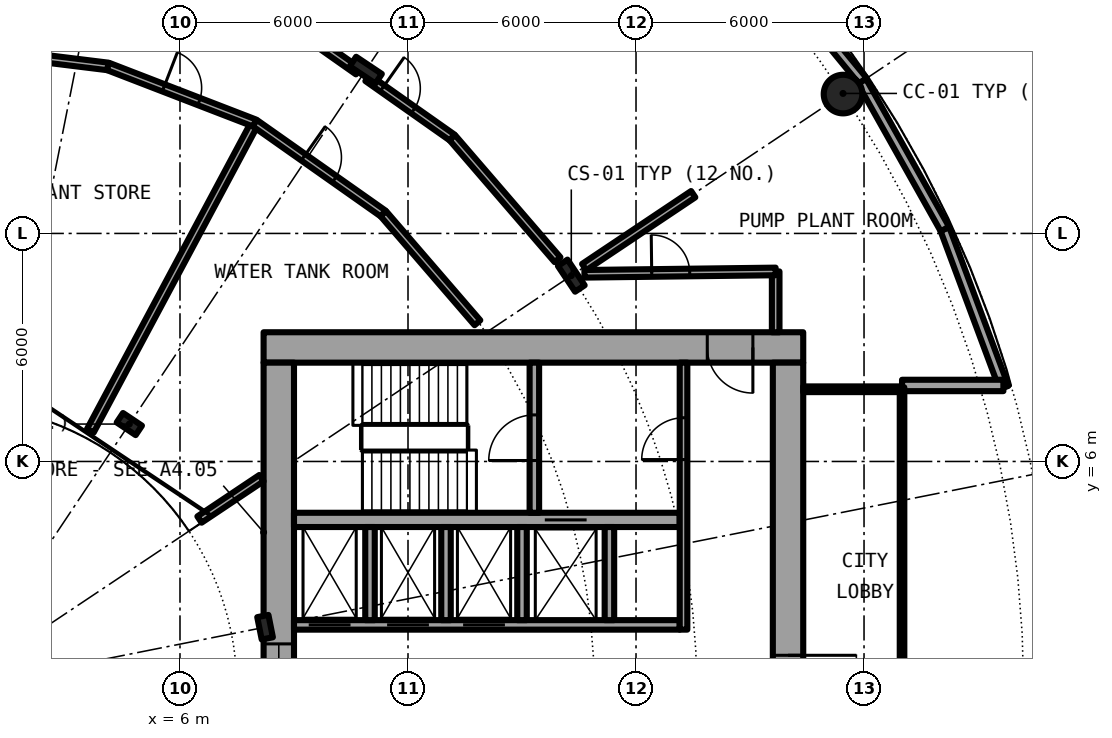
"""IFC4 building model, lengths in metres.
Left out: names, types, materials, properties, quantities, classifications, styles, units other than length and angle.
Written with IfcOpenShell. Run it as: python <this file> out.ifc"""

import sys

from ifc_helpers import new_model, si_unit, direction, frame, frame_2d, origin, origin_2d, place, context, subcontext, project, spatial, rectangle, hollow_circle, i_section, extrude, element, fill, save


model = new_model("IFC4")
c1 = context("Model", 3, precision=1e-05, world=origin(), true_north=direction((0.0, 1.0)))
c2 = subcontext(c1, "Body", "Model", "MODEL_VIEW")
j1 = project(units=[si_unit("LENGTHUNIT", "METRE"), si_unit("PLANEANGLEUNIT", "RADIAN")], contexts=[c1])
p1 = place(None, origin())
s1 = spatial("IfcSite", under=j1, at=p1, CompositionType="ELEMENT")
p2 = place(p1, origin())
s2 = spatial("IfcBuilding", under=s1, at=p2, CompositionType="ELEMENT")
p3 = place(p2, frame((0.0, 0.0, 18.3)))
s3 = spatial("IfcBuildingStorey", under=s2, at=p3, CompositionType="ELEMENT", Elevation=18.3)
p4 = place(p3, frame((23.448, 15.667, 0.0), z_axis=(0.0, 0.0, 1.0), x_axis=(1.0, 0.0, 0.0)))
e1 = element("IfcColumn", 1, at=p4, inside=s3, PredefinedType="COLUMN", context=c2, shape_type="SweptSolid", body=[
    extrude(hollow_circle(Radius=0.508, WallThickness=0.05, at=origin_2d()), origin(), (0.0, 0.0, 1.0), 4.5),
])
for number, where, z_axis, x_axis in (
    (2, (16.297, 10.889, 0.0), (0.0, 0.0, 1.0), (0.831, 0.556, 0.0)),
    (3, (10.889, 16.297, 0.0), (0.0, 0.0, 1.0), (0.556, 0.831, 0.0)),
):
    element("IfcColumn", number, at=place(p3, frame(where, z_axis=z_axis, x_axis=x_axis)), inside=s3, PredefinedType="COLUMN", context=c2, shape_type="SweptSolid", body=[
        extrude(i_section(OverallWidth=0.303, OverallDepth=0.814, WebThickness=0.021, FlangeThickness=0.04, FilletRadius=0.03, at=origin_2d()), origin(), (0.0, 0.0, 1.0), 4.5),
    ])
for number, where, z_axis, x_axis in (
    (4, (8.239, 1.639, 0.0), (0.0, 0.0, 1.0), (0.981, 0.195, 0.0)),
    (5, (4.667, 6.984, 0.0), (0.0, 0.0, 1.0), (0.556, 0.831, 0.0)),
):
    element("IfcColumn", number, at=place(p3, frame(where, z_axis=z_axis, x_axis=x_axis)), inside=s3, PredefinedType="COLUMN", context=c2, shape_type="SweptSolid", body=[
        extrude(i_section(OverallWidth=0.3, OverallDepth=0.6, WebThickness=0.015, FlangeThickness=0.03, FilletRadius=0.027, at=origin_2d()), origin(), (0.0, 0.0, 1.0), 4.5),
    ])
p5 = place(p3, frame((23.967, 16.014, 0.0), z_axis=(0.0, 0.0, 1.0), x_axis=(-0.634403999748, 0.773001659186, 0.0)))
e6 = element("IfcWall", 6, at=p5, inside=s3, PredefinedType="SOLIDWALL", context=c2, shape_type="SweptSolid", body=[
    extrude(rectangle(XDim=5.651, YDim=0.25, at=frame_2d((2.825, 0.0))), origin(), (0.0, 0.0, 1.0), 4.15),
])
p6 = place(p3, frame((27.682, 7.945, 0.0), z_axis=(0.0, 0.0, 1.0), x_axis=(-0.349247811493, 0.937030397675, 0.0)))
e7 = element("IfcWall", 7, at=p6, inside=s3, PredefinedType="SOLIDWALL", context=c2, shape_type="SweptSolid", body=[
    extrude(rectangle(XDim=4.452, YDim=0.25, at=frame_2d((2.226, 0.0))), origin(), (0.0, 0.0, 1.0), 4.15),
])
p7 = place(p3, frame((26.127, 12.117, 0.0), z_axis=(0.0, 0.0, 1.0), x_axis=(-0.489696356642, 0.871893042919, 0.0)))
e8 = element("IfcWall", 8, at=p7, inside=s3, PredefinedType="SOLIDWALL", context=c2, shape_type="SweptSolid", body=[
    extrude(rectangle(XDim=4.454, YDim=0.25, at=frame_2d((2.227, 0.0))), origin(), (0.0, 0.0, 1.0), 4.15),
])
p8 = place(p3, frame((25.0, 8.0, 0.0), z_axis=(0.0, 0.0, 1.0), x_axis=(1.0, 0.0, 0.0)))
e9 = element("IfcWall", 9, at=p8, inside=s3, PredefinedType="SOLIDWALL", context=c2, shape_type="SweptSolid", body=[
    extrude(rectangle(XDim=2.667, YDim=0.3, at=frame_2d((1.333, 0.0))), origin(), (0.0, 0.0, 1.0), 4.15),
])
p9 = place(p3, frame((22.4, 9.0, 0.0), z_axis=(0.0, 0.0, 1.0), x_axis=(-1.0, 0.0, 0.0)))
e10 = element("IfcWall", 10, at=p9, inside=s3, PredefinedType="SHEAR", context=c2, shape_type="SweptSolid", body=[
    extrude(rectangle(XDim=14.2, YDim=0.8, at=frame_2d((7.1, 0.0))), origin(), (0.0, 0.0, 1.0), 4.5),
])
p10 = place(p9, frame((1.325, 0.0, 0.0)))
e11 = element("IfcOpeningElement", 11, at=p10, cuts=e10, PredefinedType="OPENING", context=c2, shape_type="SweptSolid", body=[
    extrude(rectangle(XDim=1.2, YDim=2.3, at=frame_2d((0.6, 1.15))), frame((0.0, 0.41, 0.0), z_axis=(0.0, -1.0, 0.0), x_axis=(1.0, 0.0, 0.0)), (0.0, 0.0, 1.0), 0.82),
])
p11 = place(p3, frame((22.0, 8.6, 0.0), z_axis=(0.0, 0.0, 1.0), x_axis=(0.0, -1.0, 0.0)))
e12 = element("IfcWall", 12, at=p11, inside=s3, PredefinedType="SHEAR", context=c2, shape_type="SweptSolid", body=[
    extrude(rectangle(XDim=17.2, YDim=0.8, at=frame_2d((8.6, 0.0))), origin(), (0.0, 0.0, 1.0), 4.5),
])
p12 = place(p11, frame((7.7, 0.0, 0.0)))
e13 = element("IfcOpeningElement", 13, at=p12, cuts=e12, PredefinedType="OPENING", context=c2, shape_type="SweptSolid", body=[
    extrude(rectangle(XDim=1.8, YDim=2.3, at=frame_2d((0.9, 1.15))), frame((0.0, 0.41, 0.0), z_axis=(0.0, -1.0, 0.0), x_axis=(1.0, 0.0, 0.0)), (0.0, 0.0, 1.0), 0.82),
])
p13 = place(p3, frame((8.6, -8.6, 0.0), z_axis=(0.0, 0.0, 1.0), x_axis=(0.0, 1.0, 0.0)))
e14 = element("IfcWall", 14, at=p13, inside=s3, PredefinedType="SHEAR", context=c2, shape_type="SweptSolid", body=[
    extrude(rectangle(XDim=17.2, YDim=0.8, at=frame_2d((8.6, 0.0))), origin(), (0.0, 0.0, 1.0), 4.5),
])
p14 = place(p13, frame((7.4, 0.0, 0.1)))
e15 = element("IfcOpeningElement", 15, at=p14, cuts=e14, PredefinedType="OPENING", context=c2, shape_type="SweptSolid", body=[
    extrude(rectangle(XDim=2.4, YDim=2.2, at=frame_2d((1.2, 1.1))), frame((0.0, 0.41, 0.0), z_axis=(0.0, -1.0, 0.0), x_axis=(1.0, 0.0, 0.0)), (0.0, 0.0, 1.0), 0.82),
])
p15 = place(p3, frame((9.0, 1.7, 0.0), z_axis=(0.0, 0.0, 1.0), x_axis=(1.0, 0.0, 0.0)))
e16 = element("IfcWall", 16, at=p15, inside=s3, PredefinedType="SHEAR", context=c2, shape_type="SweptSolid", body=[
    extrude(rectangle(XDim=10.15, YDim=0.25, at=frame_2d((5.075, 0.0))), origin(), (0.0, 0.0, 1.0), 4.5),
])
p16 = place(p15, frame((0.387, 0.0, 0.0)))
e17 = element("IfcOpeningElement", 17, at=p16, cuts=e16, PredefinedType="OPENING", context=c2, shape_type="SweptSolid", body=[
    extrude(rectangle(XDim=1.1, YDim=2.3, at=frame_2d((0.55, 1.15))), frame((0.0, 0.135, 0.0), z_axis=(0.0, -1.0, 0.0), x_axis=(1.0, 0.0, 0.0)), (0.0, 0.0, 1.0), 0.27),
])
p17 = place(p15, frame((2.45, 0.0, 0.0)))
e18 = element("IfcOpeningElement", 18, at=p17, cuts=e16, PredefinedType="OPENING", context=c2, shape_type="SweptSolid", body=[
    extrude(rectangle(XDim=1.1, YDim=2.3, at=frame_2d((0.55, 1.15))), frame((0.0, 0.135, 0.0), z_axis=(0.0, -1.0, 0.0), x_axis=(1.0, 0.0, 0.0)), (0.0, 0.0, 1.0), 0.27),
])
p18 = place(p15, frame((4.45, 0.0, 0.0)))
e19 = element("IfcOpeningElement", 19, at=p18, cuts=e16, PredefinedType="OPENING", context=c2, shape_type="SweptSolid", body=[
    extrude(rectangle(XDim=1.1, YDim=2.3, at=frame_2d((0.55, 1.15))), frame((0.0, 0.135, 0.0), z_axis=(0.0, -1.0, 0.0), x_axis=(1.0, 0.0, 0.0)), (0.0, 0.0, 1.0), 0.27),
])
p19 = place(p3, frame((9.0, 4.462, 0.0), z_axis=(0.0, 0.0, 1.0), x_axis=(1.0, 0.0, 0.0)))
e20 = element("IfcWall", 20, at=p19, inside=s3, PredefinedType="SHEAR", context=c2, shape_type="SweptSolid", body=[
    extrude(rectangle(XDim=10.15, YDim=0.375, at=frame_2d((5.075, 0.0))), origin(), (0.0, 0.0, 1.0), 4.5),
])
p20 = place(p19, frame((6.6, 0.0, 0.0)))
e21 = element("IfcOpeningElement", 21, at=p20, cuts=e20, PredefinedType="OPENING", context=c2, shape_type="SweptSolid", body=[
    extrude(rectangle(XDim=1.1, YDim=2.3, at=frame_2d((0.55, 1.15))), frame((0.0, 0.198, 0.0), z_axis=(0.0, -1.0, 0.0), x_axis=(1.0, 0.0, 0.0)), (0.0, 0.0, 1.0), 0.395),
])
p21 = place(p3, frame((15.325, 4.65, 0.0), z_axis=(0.0, 0.0, 1.0), x_axis=(0.0, 1.0, 0.0)))
e22 = element("IfcWall", 22, at=p21, inside=s3, PredefinedType="SHEAR", context=c2, shape_type="SweptSolid", body=[
    extrude(rectangle(XDim=3.95, YDim=0.25, at=frame_2d((1.975, 0.0))), origin(), (0.0, 0.0, 1.0), 4.5),
])
p22 = place(p21, frame((1.375, 0.0, 0.0)))
e23 = element("IfcOpeningElement", 23, at=p22, cuts=e22, PredefinedType="OPENING", context=c2, shape_type="SweptSolid", body=[
    extrude(rectangle(XDim=1.2, YDim=2.3, at=frame_2d((0.6, 1.15))), frame((0.0, 0.135, 0.0), z_axis=(0.0, -1.0, 0.0), x_axis=(1.0, 0.0, 0.0)), (0.0, 0.0, 1.0), 0.27),
])
for number, where, z_axis, x_axis in (
    (24, (15.0, 1.825, 0.0), (0.0, 0.0, 1.0), (0.0, 1.0, 0.0)),
    (25, (17.3, 1.825, 0.0), (0.0, 0.0, 1.0), (0.0, 1.0, 0.0)),
):
    element("IfcWall", number, at=place(p3, frame(where, z_axis=z_axis, x_axis=x_axis)), inside=s3, PredefinedType="SOLIDWALL", context=c2, shape_type="SweptSolid", body=[
        extrude(rectangle(XDim=2.45, YDim=0.25, at=frame_2d((1.225, 0.0))), origin(), (0.0, 0.0, 1.0), 4.15),
    ])
p23 = place(p3, frame((19.25, 1.575, 0.0), z_axis=(0.0, 0.0, 1.0), x_axis=(0.0, 1.0, 0.0)))
e26 = element("IfcWall", 26, at=p23, inside=s3, PredefinedType="SOLIDWALL", context=c2, shape_type="SweptSolid", body=[
    extrude(rectangle(XDim=7.025, YDim=0.2, at=frame_2d((3.513, 0.0))), origin(), (0.0, 0.0, 1.0), 4.15),
])
p24 = place(p23, frame((4.475, 0.0, 0.0)))
e27 = element("IfcOpeningElement", 27, at=p24, cuts=e26, PredefinedType="OPENING", context=c2, shape_type="SweptSolid", body=[
    extrude(rectangle(XDim=1.1, YDim=2.3, at=frame_2d((0.55, 1.15))), frame((0.0, 0.11, 0.0), z_axis=(0.0, -1.0, 0.0), x_axis=(1.0, 0.0, 0.0)), (0.0, 0.0, 1.0), 0.22),
])
for number, where, z_axis, x_axis in (
    (28, (11.0, 1.825, 0.0), (0.0, 0.0, 1.0), (0.0, 1.0, 0.0)),
    (29, (13.0, 1.825, 0.0), (0.0, 0.0, 1.0), (0.0, 1.0, 0.0)),
):
    element("IfcWall", number, at=place(p3, frame(where, z_axis=z_axis, x_axis=x_axis)), inside=s3, PredefinedType="SOLIDWALL", context=c2, shape_type="SweptSolid", body=[
        extrude(rectangle(XDim=2.45, YDim=0.25, at=frame_2d((1.225, 0.0))), origin(), (0.0, 0.0, 1.0), 4.15),
    ])
p25 = place(p3, frame((22.4, 7.9, 0.0), z_axis=(0.0, 0.0, 1.0), x_axis=(1.0, 0.0, 0.0)))
e30 = element("IfcWall", 30, at=p25, inside=s3, PredefinedType="PARTITIONING", context=c2, shape_type="SweptSolid", body=[
    extrude(rectangle(XDim=2.54, YDim=0.15, at=frame_2d((1.27, 0.0))), origin(), (0.0, 0.0, 1.0), 4.15),
])
p26 = place(p3, frame((25.0, -7.95, 0.0), z_axis=(0.0, 0.0, 1.0), x_axis=(0.0, 1.0, 0.0)))
e31 = element("IfcWall", 31, at=p26, inside=s3, PredefinedType="PARTITIONING", context=c2, shape_type="SweptSolid", body=[
    extrude(rectangle(XDim=15.9, YDim=0.12, at=frame_2d((7.95, 0.0))), origin(), (0.0, 0.0, 1.0), 4.15),
])
p27 = place(p26, frame((0.95, 0.0, 0.1)))
e32 = element("IfcOpeningElement", 32, at=p27, cuts=e31, PredefinedType="OPENING", context=c2, shape_type="SweptSolid", body=[
    extrude(rectangle(XDim=14.0, YDim=3.8, at=frame_2d((7.0, 1.9))), frame((0.0, 0.07, 0.0), z_axis=(0.0, -1.0, 0.0), x_axis=(1.0, 0.0, 0.0)), (0.0, 0.0, 1.0), 0.14),
])
p28 = place(p3, frame((21.675, 9.4, 0.0), z_axis=(0.0, 0.0, 1.0), x_axis=(0.0, 1.0, 0.0)))
e33 = element("IfcWall", 33, at=p28, inside=s3, PredefinedType="PARTITIONING", context=c2, shape_type="SweptSolid", body=[
    extrude(rectangle(XDim=1.6, YDim=0.2, at=frame_2d((0.8, 0.0))), origin(), (0.0, 0.0, 1.0), 4.15),
])
p29 = place(p3, frame((16.636, 11.115, 0.0), z_axis=(0.0, 0.0, 1.0), x_axis=(0.831331256958, 0.555777240632, 0.0)))
e34 = element("IfcWall", 34, at=p29, inside=s3, PredefinedType="PARTITIONING", context=c2, shape_type="SweptSolid", body=[
    extrude(rectangle(XDim=3.451, YDim=0.2, at=frame_2d((1.726, 0.0))), origin(), (0.0, 0.0, 1.0), 3.23),
])
p30 = place(p3, frame((3.641, 6.807, 0.0), z_axis=(0.0, 0.0, 1.0), x_axis=(0.471428625665, 0.881904218667, 0.0)))
e35 = element("IfcWall", 35, at=p30, inside=s3, PredefinedType="PARTITIONING", context=c2, shape_type="SweptSolid", body=[
    extrude(rectangle(XDim=9.18, YDim=0.2, at=frame_2d((4.59, 0.0))), origin(), (0.0, 0.0, 1.0), 4.15),
])
p31 = place(p3, frame((6.513, 4.472, 0.0), z_axis=(0.0, 0.0, 1.0), x_axis=(0.831417956244, 0.555647533996, 0.0)))
e36 = element("IfcWall", 36, at=p31, inside=s3, PredefinedType="PARTITIONING", context=c2, shape_type="SweptSolid", body=[
    extrude(rectangle(XDim=1.962, YDim=0.2, at=frame_2d((0.981, 0.0))), origin(), (0.0, 0.0, 1.0), 4.15),
])
p32 = place(p3, frame((16.643, 10.938, 0.0), z_axis=(0.0, 0.0, 1.0), x_axis=(0.999924074118, 0.012322580895, 0.0)))
e37 = element("IfcWall", 37, at=p32, inside=s3, PredefinedType="PARTITIONING", context=c2, shape_type="SweptSolid", body=[
    extrude(rectangle(XDim=5.032, YDim=0.2, at=frame_2d((2.516, 0.0))), origin(), (0.0, 0.0, 1.0), 4.15),
])
p33 = place(p32, frame((1.77, 0.0, 0.0)))
e38 = element("IfcOpeningElement", 38, at=p33, cuts=e37, PredefinedType="OPENING", context=c2, shape_type="SweptSolid", body=[
    extrude(rectangle(XDim=1.0, YDim=2.3, at=frame_2d((0.5, 1.15))), frame((0.0, 0.11, 0.0), z_axis=(0.0, -1.0, 0.0), x_axis=(1.0, 0.0, 0.0)), (0.0, 0.0, 1.0), 0.22),
])
p34 = place(p3, frame((0.0, 16.9, 0.0), z_axis=(0.0, 0.0, 1.0), x_axis=(0.992496033272, -0.122276833211, 0.0)))
e39 = element("IfcWall", 39, at=p34, inside=s3, PredefinedType="PARTITIONING", context=c2, shape_type="SweptSolid", body=[
    extrude(rectangle(XDim=4.137, YDim=0.2, at=frame_2d((2.068, 0.0))), origin(), (0.0, 0.0, 1.0), 4.15),
])
p35 = place(p3, frame((4.106, 16.394, 0.0), z_axis=(0.0, 0.0, 1.0), x_axis=(0.932943640288, -0.360022449363, 0.0)))
e40 = element("IfcWall", 40, at=p35, inside=s3, PredefinedType="PARTITIONING", context=c2, shape_type="SweptSolid", body=[
    extrude(rectangle(XDim=4.139, YDim=0.2, at=frame_2d((2.069, 0.0))), origin(), (0.0, 0.0, 1.0), 4.15),
])
p36 = place(p35, frame((1.569, 0.0, 0.0)))
e41 = element("IfcOpeningElement", 41, at=p36, cuts=e40, PredefinedType="OPENING", context=c2, shape_type="SweptSolid", body=[
    extrude(rectangle(XDim=1.0, YDim=2.3, at=frame_2d((0.5, 1.15))), frame((0.0, 0.11, 0.0), z_axis=(0.0, -1.0, 0.0), x_axis=(1.0, 0.0, 0.0)), (0.0, 0.0, 1.0), 0.22),
])
p37 = place(p3, frame((7.967, 14.904, 0.0), z_axis=(0.0, 0.0, 1.0), x_axis=(0.817567680547, -0.575832517079, 0.0)))
e42 = element("IfcWall", 42, at=p37, inside=s3, PredefinedType="PARTITIONING", context=c2, shape_type="SweptSolid", body=[
    extrude(rectangle(XDim=4.137, YDim=0.2, at=frame_2d((2.068, 0.0))), origin(), (0.0, 0.0, 1.0), 4.15),
])
p38 = place(p37, frame((1.568, 0.0, 0.0)))
e43 = element("IfcOpeningElement", 43, at=p38, cuts=e42, PredefinedType="OPENING", context=c2, shape_type="SweptSolid", body=[
    extrude(rectangle(XDim=1.0, YDim=2.3, at=frame_2d((0.5, 1.15))), frame((0.0, 0.11, 0.0), z_axis=(0.0, -1.0, 0.0), x_axis=(1.0, 0.0, 0.0)), (0.0, 0.0, 1.0), 0.22),
])
p39 = place(p3, frame((11.349, 12.522, 0.0), z_axis=(0.0, 0.0, 1.0), x_axis=(0.653220956969, -0.757167340406, 0.0)))
e44 = element("IfcWall", 44, at=p39, inside=s3, PredefinedType="PARTITIONING", context=c2, shape_type="SweptSolid", body=[
    extrude(rectangle(XDim=3.793, YDim=0.2, at=frame_2d((1.896, 0.0))), origin(), (0.0, 0.0, 1.0), 4.15),
])
p40 = place(p3, frame((9.239, 17.286, 0.0), z_axis=(0.0, 0.0, 1.0), x_axis=(0.817849682833, -0.575431921508, 0.0)))
e45 = element("IfcWall", 45, at=p40, inside=s3, PredefinedType="PARTITIONING", context=c2, shape_type="SweptSolid", body=[
    extrude(rectangle(XDim=1.771, YDim=0.2, at=frame_2d((0.885, 0.0))), origin(), (0.0, 0.0, 1.0), 3.73),
])
p41 = place(p3, frame((10.935, 16.092, 0.0), z_axis=(0.0, 0.0, 1.0), x_axis=(0.817595540973, -0.575792958781, 0.0)))
e46 = element("IfcWall", 46, at=p41, inside=s3, PredefinedType="PARTITIONING", context=c2, shape_type="SweptSolid", body=[
    extrude(rectangle(XDim=2.725, YDim=0.2, at=frame_2d((1.363, 0.0))), origin(), (0.0, 0.0, 1.0), 3.73),
])
p42 = place(p41, frame((0.476, 0.0, 0.0)))
e47 = element("IfcOpeningElement", 47, at=p42, cuts=e46, PredefinedType="OPENING", context=c2, shape_type="SweptSolid", body=[
    extrude(rectangle(XDim=1.0, YDim=2.3, at=frame_2d((0.5, 1.15))), frame((0.0, 0.11, 0.0), z_axis=(0.0, -1.0, 0.0), x_axis=(1.0, 0.0, 0.0)), (0.0, 0.0, 1.0), 0.22),
])
p43 = place(p3, frame((13.163, 14.523, 0.0), z_axis=(0.0, 0.0, 1.0), x_axis=(0.653128497371, -0.757247097005, 0.0)))
e48 = element("IfcWall", 48, at=p43, inside=s3, PredefinedType="PARTITIONING", context=c2, shape_type="SweptSolid", body=[
    extrude(rectangle(XDim=4.244, YDim=0.2, at=frame_2d((2.122, 0.0))), origin(), (0.0, 0.0, 1.0), 3.73),
])
p44 = place(p16, origin())
e49 = element("IfcDoor", 49, at=p44, inside=s3, OperationType="DOUBLE_DOOR_SLIDING", PredefinedType="DOOR", context=c2, shape_type="SweptSolid", body=[
    extrude(rectangle(XDim=1.1, YDim=2.3, at=frame_2d((0.55, 1.15))), frame((0.0, 0.025, 0.0), z_axis=(0.0, -1.0, 0.0), x_axis=(1.0, 0.0, 0.0)), (0.0, 0.0, 1.0), 0.05),
])
fill(e17, e49)
p45 = place(p17, origin())
e50 = element("IfcDoor", 50, at=p45, inside=s3, OperationType="DOUBLE_DOOR_SLIDING", PredefinedType="DOOR", context=c2, shape_type="SweptSolid", body=[
    extrude(rectangle(XDim=1.1, YDim=2.3, at=frame_2d((0.55, 1.15))), frame((0.0, 0.025, 0.0), z_axis=(0.0, -1.0, 0.0), x_axis=(1.0, 0.0, 0.0)), (0.0, 0.0, 1.0), 0.05),
])
fill(e18, e50)
p46 = place(p18, origin())
e51 = element("IfcDoor", 51, at=p46, inside=s3, OperationType="DOUBLE_DOOR_SLIDING", PredefinedType="DOOR", context=c2, shape_type="SweptSolid", body=[
    extrude(rectangle(XDim=1.1, YDim=2.3, at=frame_2d((0.55, 1.15))), frame((0.0, 0.025, 0.0), z_axis=(0.0, -1.0, 0.0), x_axis=(1.0, 0.0, 0.0)), (0.0, 0.0, 1.0), 0.05),
])
fill(e19, e51)
p47 = place(p20, origin())
e52 = element("IfcDoor", 52, at=p47, inside=s3, OperationType="DOUBLE_DOOR_SLIDING", PredefinedType="DOOR", context=c2, shape_type="SweptSolid", body=[
    extrude(rectangle(XDim=1.1, YDim=2.3, at=frame_2d((0.55, 1.15))), frame((0.0, 0.025, 0.0), z_axis=(0.0, -1.0, 0.0), x_axis=(1.0, 0.0, 0.0)), (0.0, 0.0, 1.0), 0.05),
])
fill(e21, e52)
p48 = place(p22, origin())
e53 = element("IfcDoor", 53, at=p48, inside=s3, OperationType="SINGLE_SWING_LEFT", PredefinedType="DOOR", context=c2, shape_type="SweptSolid", body=[
    extrude(rectangle(XDim=1.2, YDim=2.3, at=frame_2d((0.6, 1.15))), frame((0.0, 0.025, 0.0), z_axis=(0.0, -1.0, 0.0), x_axis=(1.0, 0.0, 0.0)), (0.0, 0.0, 1.0), 0.05),
])
fill(e23, e53)
p49 = place(p24, origin())
e54 = element("IfcDoor", 54, at=p49, inside=s3, OperationType="SINGLE_SWING_LEFT", PredefinedType="DOOR", context=c2, shape_type="SweptSolid", body=[
    extrude(rectangle(XDim=1.1, YDim=2.3, at=frame_2d((0.55, 1.15))), frame((0.0, 0.025, 0.0), z_axis=(0.0, -1.0, 0.0), x_axis=(1.0, 0.0, 0.0)), (0.0, 0.0, 1.0), 0.05),
])
fill(e27, e54)
p50 = place(p10, origin())
e55 = element("IfcDoor", 55, at=p50, inside=s3, OperationType="SINGLE_SWING_RIGHT", PredefinedType="DOOR", context=c2, shape_type="SweptSolid", body=[
    extrude(rectangle(XDim=1.2, YDim=2.3, at=frame_2d((0.6, 1.15))), frame((0.0, 0.025, 0.0), z_axis=(0.0, -1.0, 0.0), x_axis=(1.0, 0.0, 0.0)), (0.0, 0.0, 1.0), 0.05),
])
fill(e11, e55)
p51 = place(p12, origin())
e56 = element("IfcDoor", 56, at=p51, inside=s3, OperationType="SINGLE_SWING_LEFT", PredefinedType="DOOR", context=c2, shape_type="SweptSolid", body=[
    extrude(rectangle(XDim=1.8, YDim=2.3, at=frame_2d((0.9, 1.15))), frame((0.0, 0.025, 0.0), z_axis=(0.0, -1.0, 0.0), x_axis=(1.0, 0.0, 0.0)), (0.0, 0.0, 1.0), 0.05),
])
fill(e13, e56)
p52 = place(p14, origin())
e57 = element("IfcWindow", 57, at=p52, inside=s3, PartitioningType="SINGLE_PANEL", PredefinedType="WINDOW", context=c2, shape_type="SweptSolid", body=[
    extrude(rectangle(XDim=2.4, YDim=2.2, at=frame_2d((1.2, 1.1))), frame((0.0, 0.03, 0.0), z_axis=(0.0, -1.0, 0.0), x_axis=(1.0, 0.0, 0.0)), (0.0, 0.0, 1.0), 0.06),
])
fill(e15, e57)
p53 = place(p27, origin())
e58 = element("IfcWindow", 58, at=p53, inside=s3, PartitioningType="SINGLE_PANEL", PredefinedType="WINDOW", context=c2, shape_type="SweptSolid", body=[
    extrude(rectangle(XDim=14.0, YDim=3.8, at=frame_2d((7.0, 1.9))), frame((0.0, 0.03, 0.0), z_axis=(0.0, -1.0, 0.0), x_axis=(1.0, 0.0, 0.0)), (0.0, 0.0, 1.0), 0.06),
])
fill(e32, e58)
p54 = place(p42, origin())
e59 = element("IfcDoor", 59, at=p54, inside=s3, OperationType="SINGLE_SWING_LEFT", PredefinedType="DOOR", context=c2, shape_type="SweptSolid", body=[
    extrude(rectangle(XDim=1.0, YDim=2.3, at=frame_2d((0.5, 1.15))), frame((0.0, 0.025, 0.0), z_axis=(0.0, -1.0, 0.0), x_axis=(1.0, 0.0, 0.0)), (0.0, 0.0, 1.0), 0.05),
])
fill(e47, e59)
p55 = place(p38, origin())
e60 = element("IfcDoor", 60, at=p55, inside=s3, OperationType="SINGLE_SWING_LEFT", PredefinedType="DOOR", context=c2, shape_type="SweptSolid", body=[
    extrude(rectangle(XDim=1.0, YDim=2.3, at=frame_2d((0.5, 1.15))), frame((0.0, 0.025, 0.0), z_axis=(0.0, -1.0, 0.0), x_axis=(1.0, 0.0, 0.0)), (0.0, 0.0, 1.0), 0.05),
])
fill(e43, e60)
p56 = place(p36, origin())
e61 = element("IfcDoor", 61, at=p56, inside=s3, OperationType="SINGLE_SWING_LEFT", PredefinedType="DOOR", context=c2, shape_type="SweptSolid", body=[
    extrude(rectangle(XDim=1.0, YDim=2.3, at=frame_2d((0.5, 1.15))), frame((0.0, 0.025, 0.0), z_axis=(0.0, -1.0, 0.0), x_axis=(1.0, 0.0, 0.0)), (0.0, 0.0, 1.0), 0.05),
])
fill(e41, e61)
p57 = place(p33, origin())
e62 = element("IfcDoor", 62, at=p57, inside=s3, OperationType="SINGLE_SWING_LEFT", PredefinedType="DOOR", context=c2, shape_type="SweptSolid", body=[
    extrude(rectangle(XDim=1.0, YDim=2.3, at=frame_2d((0.5, 1.15))), frame((0.0, 0.025, 0.0), z_axis=(0.0, -1.0, 0.0), x_axis=(1.0, 0.0, 0.0)), (0.0, 0.0, 1.0), 0.05),
])
fill(e38, e62)
save(model, sys.argv[1])
